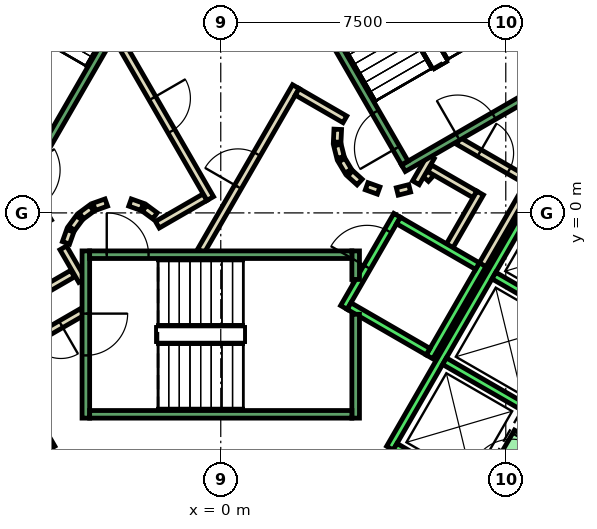
"""IFC4 building model, lengths in metres.
Left out: names, types, materials, properties, quantities, classifications, styles, units other than length and angle.
Written with IfcOpenShell. Run it as: python <this file> out.ifc"""

import sys

from ifc_helpers import new_model, si_unit, direction, frame, frame_2d, origin, place, context, subcontext, project, spatial, polyline, rectangle, outline, extrude, element, fill, save


model = new_model("IFC4")
c1 = context("Model", 3, precision=1e-05, world=origin(), true_north=direction((0.0, 1.0)))
c2 = subcontext(c1, "Body", "Model", "MODEL_VIEW")
j1 = project(units=[si_unit("LENGTHUNIT", "METRE"), si_unit("PLANEANGLEUNIT", "RADIAN")], contexts=[c1])
p1 = place(None, origin())
s1 = spatial("IfcSite", under=j1, at=p1, CompositionType="ELEMENT")
p2 = place(p1, origin())
s2 = spatial("IfcBuilding", under=s1, at=p2, CompositionType="ELEMENT")
p3 = place(p2, origin())
s3 = spatial("IfcBuildingStorey", under=s2, at=p3, CompositionType="ELEMENT", Elevation=0.0)
p4 = place(p3, frame((0.0, 0.0, -0.5)))
e1 = element("IfcWall", 1, at=p4, inside=s3, PredefinedType="SHEAR", context=c2, shape_type="SweptSolid", body=[
    extrude(outline(polyline([(8.517, 11.748), (7.651, 11.248), (12.702, 2.5), (13.856, 2.5), (8.517, 11.748)])), origin(), (0.0, 0.0, 1.0), 9.05),
])
p5 = place(p3, frame((0.0, 0.0, 3.6)))
e2 = element("IfcWall", 2, at=p5, inside=s3, PredefinedType="SHEAR", context=c2, shape_type="SweptSolid", body=[
    extrude(outline(polyline([(8.767, -6.314), (7.902, -5.814), (7.252, -6.94), (8.117, -7.44), (8.767, -6.314)])), origin(), (0.0, 0.0, 1.0), 4.95),
])
p6 = place(p3, frame((5.39, 0.898, 0.0), z_axis=(0.0, 0.0, 1.0), x_axis=(0.673828488714, 0.738887791073, 0.0)))
e3 = element("IfcWall", 3, at=p6, inside=s3, PredefinedType="PARTITIONING", context=c2, shape_type="SweptSolid", body=[
    extrude(rectangle(XDim=0.263, YDim=0.2, at=frame_2d((0.131, 0.0))), origin(), (0.0, 0.0, 1.0), 8.55),
])
p7 = place(p3, frame((5.499, 1.172, 0.0), z_axis=(0.0, 0.0, 1.0), x_axis=(0.866333505267, -0.499465972466, 0.0)))
e4 = element("IfcWall", 4, at=p7, inside=s3, PredefinedType="PARTITIONING", context=c2, shape_type="SweptSolid", body=[
    extrude(rectangle(XDim=1.374, YDim=0.2, at=frame_2d((0.687, 0.0))), origin(), (0.0, 0.0, 1.0), 8.55),
])
p8 = place(p3, frame((6.826, 0.522, 0.0), z_axis=(0.0, 0.0, 1.0), x_axis=(-0.500016722714, -0.866015748706, 0.0)))
e5 = element("IfcWall", 5, at=p8, inside=s3, PredefinedType="PARTITIONING", context=c2, shape_type="SweptSolid", body=[
    extrude(rectangle(XDim=1.7, YDim=0.2, at=frame_2d((0.85, 0.0))), origin(), (0.0, 0.0, 1.0), 8.55),
])
p9 = place(p3, frame((8.192, 0.888, 0.0), z_axis=(0.0, 0.0, 1.0), x_axis=(-0.499940625693, -0.866059680843, 0.0)))
e6 = element("IfcWall", 6, at=p9, inside=s3, PredefinedType="PARTITIONING", context=c2, shape_type="SweptSolid", body=[
    extrude(rectangle(XDim=2.68, YDim=0.2, at=frame_2d((1.34, 0.0))), origin(), (0.0, 0.0, 1.0), 8.55),
])
p10 = place(p3, frame((5.135, 0.793, 0.0), z_axis=(0.0, 0.0, 1.0), x_axis=(0.499526442893, 0.866298639529, 0.0)))
e7 = element("IfcWall", 7, at=p10, inside=s3, PredefinedType="PARTITIONING", context=c2, shape_type="SweptSolid", body=[
    extrude(rectangle(XDim=0.791, YDim=0.2, at=frame_2d((0.396, 0.0))), origin(), (0.0, 0.0, 1.0), 8.55),
])
p11 = place(p3, frame((6.25, 1.894, 0.0), z_axis=(0.0, 0.0, 1.0), x_axis=(0.866043184279, -0.499969202016, 0.0)))
e8 = element("IfcWall", 8, at=p11, inside=s3, PredefinedType="PARTITIONING", context=c2, shape_type="SweptSolid", body=[
    extrude(rectangle(XDim=2.084, YDim=0.2, at=frame_2d((1.042, 0.0))), origin(), (0.0, 0.0, 1.0), 8.55),
])
p12 = place(p11, frame((0.642, 0.0, 0.0)))
e9 = element("IfcOpeningElement", 9, at=p12, cuts=e8, PredefinedType="OPENING", context=c2, shape_type="SweptSolid", body=[
    extrude(rectangle(XDim=0.9, YDim=2.1, at=frame_2d((0.45, 1.05))), frame((0.0, 0.11, 0.0), z_axis=(0.0, -1.0, 0.0), x_axis=(1.0, 0.0, 0.0)), (0.0, 0.0, 1.0), 0.22),
])
p13 = place(p3, frame((-3.9, -1.599, 0.0), z_axis=(0.0, 0.0, 1.0), x_axis=(-0.865969445389, -0.500096910261, 0.0)))
e10 = element("IfcWall", 10, at=p13, inside=s3, PredefinedType="PARTITIONING", context=c2, shape_type="SweptSolid", body=[
    extrude(rectangle(XDim=1.373, YDim=0.2, at=frame_2d((0.687, 0.0))), origin(), (0.0, 0.0, 1.0), 8.55),
])
p14 = place(p3, frame((-4.145, -0.92, 0.0), z_axis=(0.0, 0.0, 1.0), x_axis=(0.499743786207, -0.866173278362, 0.0)))
e11 = element("IfcWall", 11, at=p14, inside=s3, PredefinedType="PARTITIONING", context=c2, shape_type="SweptSolid", body=[
    extrude(rectangle(XDim=0.991, YDim=0.2, at=frame_2d((0.495, 0.0))), origin(), (0.0, 0.0, 1.0), 8.55),
])
p15 = place(p3, frame((-3.65, -2.61, 0.0), z_axis=(0.0, 0.0, 1.0), x_axis=(-0.866072462134, -0.499918483688, 0.0)))
e12 = element("IfcWall", 12, at=p15, inside=s3, PredefinedType="PARTITIONING", context=c2, shape_type="SweptSolid", body=[
    extrude(rectangle(XDim=2.084, YDim=0.2, at=frame_2d((1.042, 0.0))), origin(), (0.0, 0.0, 1.0), 8.55),
])
p16 = place(p15, frame((0.642, 0.0, 0.0)))
e13 = element("IfcOpeningElement", 13, at=p16, cuts=e12, PredefinedType="OPENING", context=c2, shape_type="SweptSolid", body=[
    extrude(rectangle(XDim=0.9, YDim=2.1, at=frame_2d((0.45, 1.05))), frame((0.0, 0.11, 0.0), z_axis=(0.0, -1.0, 0.0), x_axis=(1.0, 0.0, 0.0)), (0.0, 0.0, 1.0), 0.22),
])
p17 = place(p3, frame((3.079, 2.199, 0.0), z_axis=(0.0, 0.0, 1.0), x_axis=(-0.047771483479, -0.998858290933, 0.0)))
e14 = element("IfcWall", 14, at=p17, inside=s3, PredefinedType="PARTITIONING", context=c2, shape_type="SweptSolid", body=[
    extrude(rectangle(XDim=0.337, YDim=0.2, at=frame_2d((0.169, 0.0))), origin(), (0.0, 0.0, 1.0), 8.55),
])
p18 = place(p3, frame((3.07, 1.786, 0.0), z_axis=(0.0, 0.0, 1.0), x_axis=(0.242705583207, -0.970099994784, 0.0)))
e15 = element("IfcWall", 15, at=p18, inside=s3, PredefinedType="PARTITIONING", context=c2, shape_type="SweptSolid", body=[
    extrude(rectangle(XDim=0.338, YDim=0.2, at=frame_2d((0.169, 0.0))), origin(), (0.0, 0.0, 1.0), 8.55),
])
for number, where, z_axis, x_axis in (
    (16, (3.182, 1.388, 0.0), (0.0, 0.0, 1.0), (0.512, -0.859, 0.0)),
    (17, (3.404, 1.039, 0.0), (0.0, 0.0, 1.0), (0.74, -0.672, 0.0)),
):
    element("IfcWall", number, at=place(p3, frame(where, z_axis=z_axis, x_axis=x_axis)), inside=s3, PredefinedType="PARTITIONING", context=c2, shape_type="SweptSolid", body=[
        extrude(rectangle(XDim=0.338, YDim=0.2, at=frame_2d((0.169, 0.0))), origin(), (0.0, 0.0, 1.0), 8.55),
    ])
p19 = place(p3, frame((3.838, 0.702, 0.0), z_axis=(0.0, 0.0, 1.0), x_axis=(0.941035081519, -0.338308993895, 0.0)))
e18 = element("IfcWall", 18, at=p19, inside=s3, PredefinedType="PARTITIONING", context=c2, shape_type="SweptSolid", body=[
    extrude(rectangle(XDim=0.337, YDim=0.2, at=frame_2d((0.168, 0.0))), origin(), (0.0, 0.0, 1.0), 8.55),
])
p20 = place(p3, frame((4.644, 0.564, 0.0), z_axis=(0.0, 0.0, 1.0), x_axis=(0.969929076366, 0.243387729394, 0.0)))
e19 = element("IfcWall", 19, at=p20, inside=s3, PredefinedType="PARTITIONING", context=c2, shape_type="SweptSolid", body=[
    extrude(rectangle(XDim=0.337, YDim=0.2, at=frame_2d((0.168, 0.0))), origin(), (0.0, 0.0, 1.0), 8.55),
])
p21 = place(p3, frame((-0.52, -1.0, 0.0), z_axis=(0.0, 0.0, 1.0), x_axis=(0.50011622646, 0.865958290007, 0.0)))
e20 = element("IfcWall", 20, at=p21, inside=s3, PredefinedType="PARTITIONING", context=c2, shape_type="SweptSolid", body=[
    extrude(rectangle(XDim=4.991, YDim=0.2, at=frame_2d((2.496, 0.0))), origin(), (0.0, 0.0, 1.0), 8.55),
])
p22 = place(p21, frame((1.945, 0.0, 0.0)))
e21 = element("IfcOpeningElement", 21, at=p22, cuts=e20, PredefinedType="OPENING", context=c2, shape_type="SweptSolid", body=[
    extrude(rectangle(XDim=1.0, YDim=2.1, at=frame_2d((0.5, 1.05))), frame((0.0, 0.11, 0.0), z_axis=(0.0, -1.0, 0.0), x_axis=(1.0, 0.0, 0.0)), (0.0, 0.0, 1.0), 0.22),
])
p23 = place(p3, frame((2.012, 3.186, 0.0), z_axis=(0.0, 0.0, 1.0), x_axis=(0.865891012941, -0.500232699559, 0.0)))
e22 = element("IfcWall", 22, at=p23, inside=s3, PredefinedType="PARTITIONING", context=c2, shape_type="SweptSolid", body=[
    extrude(rectangle(XDim=1.449, YDim=0.2, at=frame_2d((0.725, 0.0))), origin(), (0.0, 0.0, 1.0), 8.55),
])
p24 = place(p3, frame((-0.412, 0.414, 0.0), z_axis=(0.0, 0.0, 1.0), x_axis=(-0.866017369001, -0.500013916395, 0.0)))
e23 = element("IfcWall", 23, at=p24, inside=s3, PredefinedType="PARTITIONING", context=c2, shape_type="SweptSolid", body=[
    extrude(rectangle(XDim=1.45, YDim=0.2, at=frame_2d((0.725, 0.0))), origin(), (0.0, 0.0, 1.0), 8.55),
])
p25 = place(p3, frame((-1.731, -0.077, 0.0), z_axis=(0.0, 0.0, 1.0), x_axis=(-0.804311165252, 0.594208338422, 0.0)))
e24 = element("IfcWall", 24, at=p25, inside=s3, PredefinedType="PARTITIONING", context=c2, shape_type="SweptSolid", body=[
    extrude(rectangle(XDim=0.338, YDim=0.2, at=frame_2d((0.169, 0.0))), origin(), (0.0, 0.0, 1.0), 8.55),
])
p26 = place(p3, frame((-2.07, 0.16, 0.0), z_axis=(0.0, 0.0, 1.0), x_axis=(-0.942199461132, 0.335052496547, 0.0)))
e25 = element("IfcWall", 25, at=p26, inside=s3, PredefinedType="PARTITIONING", context=c2, shape_type="SweptSolid", body=[
    extrude(rectangle(XDim=0.337, YDim=0.2, at=frame_2d((0.169, 0.0))), origin(), (0.0, 0.0, 1.0), 8.55),
])
p27 = place(p3, frame((-3.012, 0.273, 0.0), z_axis=(0.0, 0.0, 1.0), x_axis=(-0.942280615813, -0.334824194261, 0.0)))
e26 = element("IfcWall", 26, at=p27, inside=s3, PredefinedType="PARTITIONING", context=c2, shape_type="SweptSolid", body=[
    extrude(rectangle(XDim=0.338, YDim=0.2, at=frame_2d((0.169, 0.0))), origin(), (0.0, 0.0, 1.0), 8.55),
])
p28 = place(p3, frame((-3.397, 0.124, 0.0), z_axis=(0.0, 0.0, 1.0), x_axis=(-0.804311165252, -0.594208338422, 0.0)))
e27 = element("IfcWall", 27, at=p28, inside=s3, PredefinedType="PARTITIONING", context=c2, shape_type="SweptSolid", body=[
    extrude(rectangle(XDim=0.338, YDim=0.2, at=frame_2d((0.169, 0.0))), origin(), (0.0, 0.0, 1.0), 8.55),
])
p29 = place(p3, frame((-3.723, -0.131, 0.0), z_axis=(0.0, 0.0, 1.0), x_axis=(-0.594675113454, -0.803966112121, 0.0)))
e28 = element("IfcWall", 28, at=p29, inside=s3, PredefinedType="PARTITIONING", context=c2, shape_type="SweptSolid", body=[
    extrude(rectangle(XDim=0.338, YDim=0.2, at=frame_2d((0.169, 0.0))), origin(), (0.0, 0.0, 1.0), 8.55),
])
p30 = place(p3, frame((-3.96, -0.47, 0.0), z_axis=(0.0, 0.0, 1.0), x_axis=(-0.334824194261, -0.942280615813, 0.0)))
e29 = element("IfcWall", 29, at=p30, inside=s3, PredefinedType="PARTITIONING", context=c2, shape_type="SweptSolid", body=[
    extrude(rectangle(XDim=0.338, YDim=0.2, at=frame_2d((0.169, 0.0))), origin(), (0.0, 0.0, 1.0), 8.55),
])
p31 = place(p3, frame((-2.771, 4.7, 0.0), z_axis=(0.0, 0.0, 1.0), x_axis=(0.499969479948, -0.866043023828, 0.0)))
e30 = element("IfcWall", 30, at=p31, inside=s3, PredefinedType="PARTITIONING", context=c2, shape_type="SweptSolid", body=[
    extrude(rectangle(XDim=4.99, YDim=0.2, at=frame_2d((2.495, 0.0))), origin(), (0.0, 0.0, 1.0), 8.55),
])
p32 = place(p31, frame((1.945, 0.0, 0.0)))
e31 = element("IfcOpeningElement", 31, at=p32, cuts=e30, PredefinedType="OPENING", context=c2, shape_type="SweptSolid", body=[
    extrude(rectangle(XDim=1.0, YDim=2.1, at=frame_2d((0.5, 1.05))), frame((0.0, 0.11, 0.0), z_axis=(0.0, -1.0, 0.0), x_axis=(1.0, 0.0, 0.0)), (0.0, 0.0, 1.0), 0.22),
])
p33 = place(p3, frame((-9.751, 2.99, 0.0), z_axis=(0.0, 0.0, 1.0), x_axis=(0.50000090737, -0.866024879913, 0.0)))
e32 = element("IfcWall", 32, at=p33, inside=s3, PredefinedType="STANDARD", context=c2, shape_type="SweptSolid", body=[
    extrude(rectangle(XDim=10.6, YDim=0.2, at=frame_2d((5.3, 0.0))), origin(), (0.0, 0.0, 1.0), 8.55),
])
p34 = place(p3, frame((3.24, -2.488, 0.0), z_axis=(0.0, 0.0, 1.0), x_axis=(0.49994636267, 0.866056369097, 0.0)))
e33 = element("IfcWall", 33, at=p34, inside=s3, PredefinedType="STANDARD", context=c2, shape_type="SweptSolid", body=[
    extrude(rectangle(XDim=2.8, YDim=0.2, at=frame_2d((1.4, 0.0))), origin(), (0.0, 0.0, 1.0), 8.55),
])
p35 = place(p34, frame((1.225, 0.0, 0.0)))
e34 = element("IfcOpeningElement", 34, at=p35, cuts=e33, PredefinedType="OPENING", context=c2, shape_type="SweptSolid", body=[
    extrude(rectangle(XDim=1.1, YDim=2.1, at=frame_2d((0.55, 1.05))), frame((0.0, 0.11, 0.0), z_axis=(0.0, -1.0, 0.0), x_axis=(1.0, 0.0, 0.0)), (0.0, 0.0, 1.0), 0.22),
])
p36 = place(p3, frame((5.492, -3.788, 0.0), z_axis=(0.0, 0.0, 1.0), x_axis=(0.500011755427, 0.866018616679, 0.0)))
e35 = element("IfcWall", 35, at=p36, inside=s3, PredefinedType="STANDARD", context=c2, shape_type="SweptSolid", body=[
    extrude(rectangle(XDim=2.8, YDim=0.2, at=frame_2d((1.4, 0.0))), origin(), (0.0, 0.0, 1.0), 8.55),
])
p37 = place(p3, frame((3.377, -2.452, 0.0), z_axis=(0.0, 0.0, 1.0), x_axis=(0.865955154139, -0.50012165622, 0.0)))
e36 = element("IfcWall", 36, at=p37, inside=s3, PredefinedType="STANDARD", context=c2, shape_type="SweptSolid", body=[
    extrude(rectangle(XDim=2.4, YDim=0.2, at=frame_2d((1.2, 0.0))), origin(), (0.0, 0.0, 1.0), 8.55),
])
p38 = place(p3, frame((4.677, -0.2, 0.0), z_axis=(0.0, 0.0, 1.0), x_axis=(0.865973769406, -0.500089422704, 0.0)))
e37 = element("IfcWall", 37, at=p38, inside=s3, PredefinedType="STANDARD", context=c2, shape_type="SweptSolid", body=[
    extrude(rectangle(XDim=2.399, YDim=0.2, at=frame_2d((1.2, 0.0))), origin(), (0.0, 0.0, 1.0), 8.55),
])
p39 = place(p3, frame((4.451, -6.19, 0.0), z_axis=(0.0, 0.0, 1.0), x_axis=(0.50000090737, 0.866024879913, 0.0)))
e38 = element("IfcWall", 38, at=p39, inside=s3, PredefinedType="STANDARD", context=c2, shape_type="SweptSolid", body=[
    extrude(rectangle(XDim=10.6, YDim=0.2, at=frame_2d((5.3, 0.0))), origin(), (0.0, 0.0, 1.0), 8.55),
])
for number, where, z_axis, x_axis in (
    (39, (4.588, -6.153, 0.0), (0.0, 0.0, 1.0), (0.866, -0.5, 0.0)),
    (40, (5.888, -3.902, 0.0), (0.0, 0.0, 1.0), (0.866, -0.5, 0.0)),
    (41, (7.188, -1.65, 0.0), (0.0, 0.0, 1.0), (0.866, -0.5, 0.0)),
):
    element("IfcWall", number, at=place(p3, frame(where, z_axis=z_axis, x_axis=x_axis)), inside=s3, PredefinedType="STANDARD", context=c2, shape_type="SweptSolid", body=[
        extrude(rectangle(XDim=2.5, YDim=0.2, at=frame_2d((1.25, 0.0))), origin(), (0.0, 0.0, 1.0), 8.55),
    ])
p40 = place(p3, frame((7.598, -7.14, 0.0), z_axis=(0.0, 0.0, 1.0), x_axis=(0.500362116554, 0.865816234728, 0.0)))
e42 = element("IfcWall", 42, at=p40, inside=s3, PredefinedType="STANDARD", context=c2, shape_type="SweptSolid", body=[
    extrude(rectangle(XDim=1.299, YDim=1.2, at=frame_2d((0.65, 0.0))), origin(), (0.0, 0.0, 1.0), 2.4),
])
p41 = place(p40, frame((0.1, 0.0, 0.0)))
e43 = element("IfcOpeningElement", 43, at=p41, cuts=e42, PredefinedType="OPENING", context=c2, shape_type="SweptSolid", body=[
    extrude(rectangle(XDim=1.1, YDim=2.3, at=frame_2d((0.55, 1.15))), frame((0.0, 0.61, 0.0), z_axis=(0.0, -1.0, 0.0), x_axis=(1.0, 0.0, 0.0)), (0.0, 0.0, 1.0), 1.22),
])
p42 = place(p3, frame((-3.55, -1.0, 0.0), z_axis=(0.0, 0.0, 1.0), x_axis=(0.0, -1.0, 0.0)))
e44 = element("IfcWall", 44, at=p42, inside=s3, PredefinedType="STANDARD", context=c2, shape_type="SweptSolid", body=[
    extrude(rectangle(XDim=4.4, YDim=0.2, at=frame_2d((2.2, 0.0))), origin(), (0.0, 0.0, 1.0), 8.55),
])
p43 = place(p42, frame((1.65, 0.0, 0.0)))
e45 = element("IfcOpeningElement", 45, at=p43, cuts=e44, PredefinedType="OPENING", context=c2, shape_type="SweptSolid", body=[
    extrude(rectangle(XDim=1.1, YDim=2.2, at=frame_2d((0.55, 1.1))), frame((0.0, 0.11, 0.0), z_axis=(0.0, -1.0, 0.0), x_axis=(1.0, 0.0, 0.0)), (0.0, 0.0, 1.0), 0.22),
])
p44 = place(p3, frame((3.55, -2.667, 0.0), z_axis=(0.0, 0.0, 1.0), x_axis=(0.0, -1.0, 0.0)))
e46 = element("IfcWall", 46, at=p44, inside=s3, PredefinedType="STANDARD", context=c2, shape_type="SweptSolid", body=[
    extrude(rectangle(XDim=2.733, YDim=0.2, at=frame_2d((1.366, 0.0))), origin(), (0.0, 0.0, 1.0), 8.55),
])
p45 = place(p3, frame((3.55, -1.0, 0.0), z_axis=(0.0, 0.0, 1.0), x_axis=(0.0, -1.0, 0.0)))
e47 = element("IfcWall", 47, at=p45, inside=s3, PredefinedType="STANDARD", context=c2, shape_type="SweptSolid", body=[
    extrude(rectangle(XDim=0.751, YDim=0.2, at=frame_2d((0.375, 0.0))), origin(), (0.0, 0.0, 1.0), 8.55),
])
p46 = place(p3, frame((-3.45, -1.1, 0.0), z_axis=(0.0, 0.0, 1.0), x_axis=(1.0, 0.0, 0.0)))
e48 = element("IfcWall", 48, at=p46, inside=s3, PredefinedType="STANDARD", context=c2, shape_type="SweptSolid", body=[
    extrude(rectangle(XDim=6.9, YDim=0.2, at=frame_2d((3.45, 0.0))), origin(), (0.0, 0.0, 1.0), 8.55),
])
p47 = place(p46, frame((0.45, 0.0, 0.0)))
e49 = element("IfcOpeningElement", 49, at=p47, cuts=e48, PredefinedType="OPENING", context=c2, shape_type="SweptSolid", body=[
    extrude(rectangle(XDim=1.1, YDim=2.2, at=frame_2d((0.55, 1.1))), frame((0.0, 0.11, 0.0), z_axis=(0.0, -1.0, 0.0), x_axis=(1.0, 0.0, 0.0)), (0.0, 0.0, 1.0), 0.22),
])
p48 = place(p3, frame((-3.45, -5.3, 0.0), z_axis=(0.0, 0.0, 1.0), x_axis=(1.0, 0.0, 0.0)))
e50 = element("IfcWall", 50, at=p48, inside=s3, PredefinedType="STANDARD", context=c2, shape_type="SweptSolid", body=[
    extrude(rectangle(XDim=6.9, YDim=0.2, at=frame_2d((3.45, 0.0))), origin(), (0.0, 0.0, 1.0), 8.55),
])
p49 = place(p3, frame((4.806, 1.176, 0.0), z_axis=(0.0, 0.0, 1.0), x_axis=(0.866059941101, 0.499940174841, 0.0)))
e51 = element("IfcWall", 51, at=p49, inside=s3, PredefinedType="STANDARD", context=c2, shape_type="SweptSolid", body=[
    extrude(rectangle(XDim=4.4, YDim=0.2, at=frame_2d((2.2, 0.0))), origin(), (0.0, 0.0, 1.0), 8.55),
])
p50 = place(p49, frame((1.65, 0.0, 0.0)))
e52 = element("IfcOpeningElement", 52, at=p50, cuts=e51, PredefinedType="OPENING", context=c2, shape_type="SweptSolid", body=[
    extrude(rectangle(XDim=1.1, YDim=2.2, at=frame_2d((0.55, 1.1))), frame((0.0, 0.11, 0.0), z_axis=(0.0, -1.0, 0.0), x_axis=(1.0, 0.0, 0.0)), (0.0, 0.0, 1.0), 0.22),
])
p51 = place(p3, frame((4.843, 1.312, 0.0), z_axis=(0.0, 0.0, 1.0), x_axis=(-0.499963383562, 0.866046543262, 0.0)))
e53 = element("IfcWall", 53, at=p51, inside=s3, PredefinedType="STANDARD", context=c2, shape_type="SweptSolid", body=[
    extrude(rectangle(XDim=6.9, YDim=0.2, at=frame_2d((3.45, 0.0))), origin(), (0.0, 0.0, 1.0), 8.55),
])
p52 = place(p51, frame((0.45, 0.0, 0.0)))
e54 = element("IfcOpeningElement", 54, at=p52, cuts=e53, PredefinedType="OPENING", context=c2, shape_type="SweptSolid", body=[
    extrude(rectangle(XDim=1.1, YDim=2.2, at=frame_2d((0.55, 1.1))), frame((0.0, 0.11, 0.0), z_axis=(0.0, -1.0, 0.0), x_axis=(1.0, 0.0, 0.0)), (0.0, 0.0, 1.0), 0.22),
])
p53 = place(p3, frame((8.48, 3.412, 0.0), z_axis=(0.0, 0.0, 1.0), x_axis=(-0.499978703459, 0.866037698999, 0.0)))
e55 = element("IfcWall", 55, at=p53, inside=s3, PredefinedType="STANDARD", context=c2, shape_type="SweptSolid", body=[
    extrude(rectangle(XDim=6.9, YDim=0.2, at=frame_2d((3.45, 0.0))), origin(), (0.0, 0.0, 1.0), 8.55),
])
p54 = place(p3, frame((-1.393, 7.288, 0.0), z_axis=(0.0, 0.0, 1.0), x_axis=(-0.499963383562, -0.866046543262, 0.0)))
e56 = element("IfcWall", 56, at=p54, inside=s3, PredefinedType="STANDARD", context=c2, shape_type="SweptSolid", body=[
    extrude(rectangle(XDim=6.9, YDim=0.2, at=frame_2d((3.45, 0.0))), origin(), (0.0, 0.0, 1.0), 8.55),
])
p55 = place(p54, frame((0.45, 0.0, 0.0)))
e57 = element("IfcOpeningElement", 57, at=p55, cuts=e56, PredefinedType="OPENING", context=c2, shape_type="SweptSolid", body=[
    extrude(rectangle(XDim=1.1, YDim=2.2, at=frame_2d((0.55, 1.1))), frame((0.0, 0.11, 0.0), z_axis=(0.0, -1.0, 0.0), x_axis=(1.0, 0.0, 0.0)), (0.0, 0.0, 1.0), 0.22),
])
p56 = place(p22, origin())
e58 = element("IfcDoor", 58, at=p56, inside=s3, OperationType="SINGLE_SWING_LEFT", PredefinedType="DOOR", context=c2, shape_type="SweptSolid", body=[
    extrude(rectangle(XDim=1.0, YDim=2.1, at=frame_2d((0.5, 1.05))), frame((0.0, 0.025, 0.0), z_axis=(0.0, -1.0, 0.0), x_axis=(1.0, 0.0, 0.0)), (0.0, 0.0, 1.0), 0.05),
])
fill(e21, e58)
p57 = place(p32, origin())
e59 = element("IfcDoor", 59, at=p57, inside=s3, OperationType="SINGLE_SWING_RIGHT", PredefinedType="DOOR", context=c2, shape_type="SweptSolid", body=[
    extrude(rectangle(XDim=1.0, YDim=2.1, at=frame_2d((0.5, 1.05))), frame((0.0, 0.025, 0.0), z_axis=(0.0, -1.0, 0.0), x_axis=(1.0, 0.0, 0.0)), (0.0, 0.0, 1.0), 0.05),
])
fill(e31, e59)
p58 = place(p12, origin())
e60 = element("IfcDoor", 60, at=p58, inside=s3, OperationType="SINGLE_SWING_LEFT", PredefinedType="DOOR", context=c2, shape_type="SweptSolid", body=[
    extrude(rectangle(XDim=0.9, YDim=2.1, at=frame_2d((0.45, 1.05))), frame((0.0, 0.025, 0.0), z_axis=(0.0, -1.0, 0.0), x_axis=(1.0, 0.0, 0.0)), (0.0, 0.0, 1.0), 0.05),
])
fill(e9, e60)
p59 = place(p16, origin())
e61 = element("IfcDoor", 61, at=p59, inside=s3, OperationType="SINGLE_SWING_LEFT", PredefinedType="DOOR", context=c2, shape_type="SweptSolid", body=[
    extrude(rectangle(XDim=0.9, YDim=2.1, at=frame_2d((0.45, 1.05))), frame((0.0, 0.025, 0.0), z_axis=(0.0, -1.0, 0.0), x_axis=(1.0, 0.0, 0.0)), (0.0, 0.0, 1.0), 0.05),
])
fill(e13, e61)
p60 = place(p41, origin())
e62 = element("IfcDoor", 62, at=p60, inside=s3, OperationType="SLIDING_TO_LEFT", PredefinedType="DOOR", context=c2, shape_type="SweptSolid", body=[
    extrude(rectangle(XDim=1.1, YDim=2.3, at=frame_2d((0.55, 1.15))), frame((0.0, 0.025, 0.0), z_axis=(0.0, -1.0, 0.0), x_axis=(1.0, 0.0, 0.0)), (0.0, 0.0, 1.0), 0.05),
])
fill(e43, e62)
p61 = place(p35, origin())
e63 = element("IfcDoor", 63, at=p61, inside=s3, OperationType="SLIDING_TO_LEFT", PredefinedType="DOOR", context=c2, shape_type="SweptSolid", body=[
    extrude(rectangle(XDim=1.1, YDim=2.1, at=frame_2d((0.55, 1.05))), frame((0.0, 0.025, 0.0), z_axis=(0.0, -1.0, 0.0), x_axis=(1.0, 0.0, 0.0)), (0.0, 0.0, 1.0), 0.05),
])
fill(e34, e63)
p62 = place(p47, origin())
e64 = element("IfcDoor", 64, at=p62, inside=s3, OperationType="SINGLE_SWING_LEFT", PredefinedType="DOOR", context=c2, shape_type="SweptSolid", body=[
    extrude(rectangle(XDim=1.1, YDim=2.2, at=frame_2d((0.55, 1.1))), frame((0.0, 0.025, 0.0), z_axis=(0.0, -1.0, 0.0), x_axis=(1.0, 0.0, 0.0)), (0.0, 0.0, 1.0), 0.05),
])
fill(e49, e64)
p63 = place(p43, origin())
e65 = element("IfcDoor", 65, at=p63, inside=s3, OperationType="SINGLE_SWING_LEFT", PredefinedType="DOOR", context=c2, shape_type="SweptSolid", body=[
    extrude(rectangle(XDim=1.1, YDim=2.2, at=frame_2d((0.55, 1.1))), frame((0.0, 0.025, 0.0), z_axis=(0.0, -1.0, 0.0), x_axis=(1.0, 0.0, 0.0)), (0.0, 0.0, 1.0), 0.05),
])
fill(e45, e65)
p64 = place(p52, origin())
e66 = element("IfcDoor", 66, at=p64, inside=s3, OperationType="SINGLE_SWING_LEFT", PredefinedType="DOOR", context=c2, shape_type="SweptSolid", body=[
    extrude(rectangle(XDim=1.1, YDim=2.2, at=frame_2d((0.55, 1.1))), frame((0.0, 0.025, 0.0), z_axis=(0.0, -1.0, 0.0), x_axis=(1.0, 0.0, 0.0)), (0.0, 0.0, 1.0), 0.05),
])
fill(e54, e66)
p65 = place(p50, origin())
e67 = element("IfcDoor", 67, at=p65, inside=s3, OperationType="SINGLE_SWING_LEFT", PredefinedType="DOOR", context=c2, shape_type="SweptSolid", body=[
    extrude(rectangle(XDim=1.1, YDim=2.2, at=frame_2d((0.55, 1.1))), frame((0.0, 0.025, 0.0), z_axis=(0.0, -1.0, 0.0), x_axis=(1.0, 0.0, 0.0)), (0.0, 0.0, 1.0), 0.05),
])
fill(e52, e67)
save(model, sys.argv[1])
